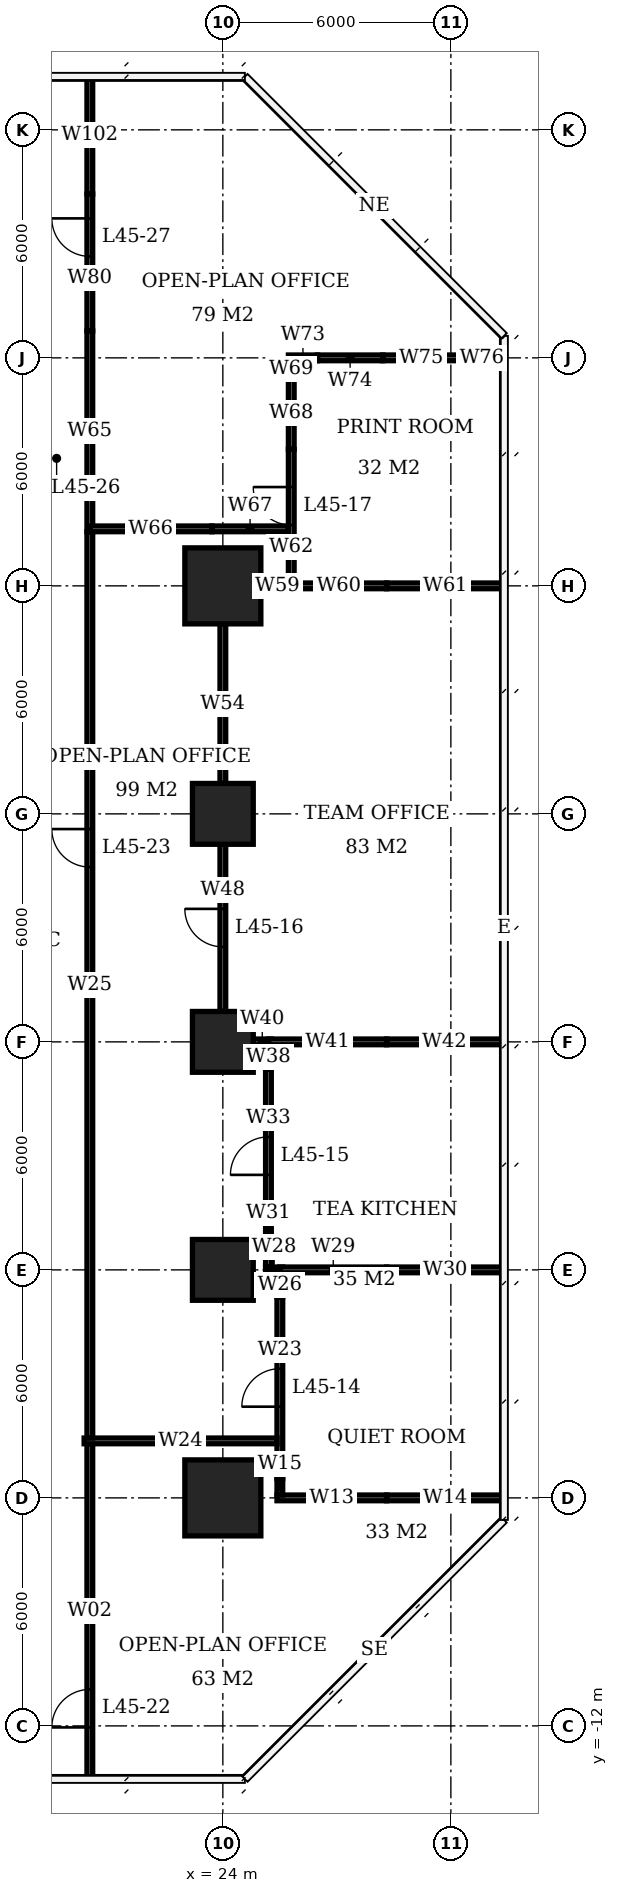
"""IFC4 building model, lengths in metres.
Left out: names, types, materials, properties, quantities, classifications, styles, units other than length and angle.
Written with IfcOpenShell. Run it as: python <this file> out.ifc"""

import sys

from ifc_helpers import new_model, si_unit, direction, frame, frame_2d, origin, origin_2d, place, context, subcontext, project, spatial, rectangle, extrude, element, fill, save


model = new_model("IFC4")
c1 = context("Model", 3, precision=1e-05, world=origin(), true_north=direction((0.0, 1.0)))
c2 = subcontext(c1, "Body", "Model", "MODEL_VIEW")
j1 = project(units=[si_unit("LENGTHUNIT", "METRE"), si_unit("PLANEANGLEUNIT", "RADIAN")], contexts=[c1])
p1 = place(None, origin())
s1 = spatial("IfcSite", under=j1, at=p1, CompositionType="ELEMENT")
p2 = place(p1, origin())
s2 = spatial("IfcBuilding", under=s1, at=p2, CompositionType="ELEMENT")
p3 = place(p2, frame((0.0, 0.0, 185.0)))
s3 = spatial("IfcBuildingStorey", under=s2, at=p3, CompositionType="ELEMENT", Elevation=185.0)
p4 = place(p3, frame((24.0, -6.0, 0.0), z_axis=(0.0, 0.0, 1.0), x_axis=(1.0, 0.0, 0.0)))
e1 = element("IfcColumn", 1, at=p4, inside=s3, PredefinedType="COLUMN", context=c2, shape_type="SweptSolid", body=[
    extrude(rectangle(XDim=2.0, YDim=2.0, at=origin_2d()), origin(), (0.0, 0.0, 1.0), 3.9),
])
for number, where, z_axis, x_axis in (
    (2, (24.0, 0.0, 0.0), (0.0, 0.0, 1.0), (1.0, 0.0, 0.0)),
    (3, (24.0, 6.0, 0.0), (0.0, 0.0, 1.0), (1.0, 0.0, 0.0)),
    (4, (24.0, 12.0, 0.0), (0.0, 0.0, 1.0), (1.0, 0.0, 0.0)),
):
    element("IfcColumn", number, at=place(p3, frame(where, z_axis=z_axis, x_axis=x_axis)), inside=s3, PredefinedType="COLUMN", context=c2, shape_type="SweptSolid", body=[
        extrude(rectangle(XDim=1.6, YDim=1.6, at=origin_2d()), origin(), (0.0, 0.0, 1.0), 3.9),
    ])
p5 = place(p3, frame((24.0, 18.0, 0.0), z_axis=(0.0, 0.0, 1.0), x_axis=(1.0, 0.0, 0.0)))
e5 = element("IfcColumn", 5, at=p5, inside=s3, PredefinedType="COLUMN", context=c2, shape_type="SweptSolid", body=[
    extrude(rectangle(XDim=2.0, YDim=2.0, at=origin_2d()), origin(), (0.0, 0.0, 1.0), 3.9),
])
p6 = place(p3, frame((25.425, -6.0, 0.0), z_axis=(0.0, 0.0, 1.0), x_axis=(1.0, 0.0, 0.0)))
e6 = element("IfcWall", 6, at=p6, inside=s3, PredefinedType="PARTITIONING", context=c2, shape_type="SweptSolid", body=[
    extrude(rectangle(XDim=2.885, YDim=0.15, at=frame_2d((1.442, 0.0))), origin(), (0.0, 0.0, 1.0), 2.65),
])
p7 = place(p3, frame((28.31, -6.0, 0.0), z_axis=(0.0, 0.0, 1.0), x_axis=(1.0, 0.0, 0.0)))
e7 = element("IfcWall", 7, at=p7, inside=s3, PredefinedType="PARTITIONING", context=c2, shape_type="SweptSolid", body=[
    extrude(rectangle(XDim=3.09, YDim=0.15, at=frame_2d((1.545, 0.0))), origin(), (0.0, 0.0, 1.0), 3.65),
])
p8 = place(p3, frame((25.125, 0.0, 0.0), z_axis=(0.0, 0.0, 1.0), x_axis=(1.0, 0.0, 0.0)))
e8 = element("IfcWall", 8, at=p8, inside=s3, PredefinedType="PARTITIONING", context=c2, shape_type="SweptSolid", body=[
    extrude(rectangle(XDim=0.45, YDim=0.15, at=frame_2d((0.225, 0.0))), origin(), (0.0, 0.0, 1.0), 2.65),
])
p9 = place(p3, frame((25.5, 0.0, 0.0), z_axis=(0.0, 0.0, 1.0), x_axis=(1.0, 0.0, 0.0)))
e9 = element("IfcWall", 9, at=p9, inside=s3, PredefinedType="PARTITIONING", context=c2, shape_type="SweptSolid", body=[
    extrude(rectangle(XDim=2.81, YDim=0.15, at=frame_2d((1.405, 0.0))), origin(), (0.0, 0.0, 1.0), 2.65),
])
p10 = place(p3, frame((28.31, 0.0, 0.0), z_axis=(0.0, 0.0, 1.0), x_axis=(1.0, 0.0, 0.0)))
e10 = element("IfcWall", 10, at=p10, inside=s3, PredefinedType="PARTITIONING", context=c2, shape_type="SweptSolid", body=[
    extrude(rectangle(XDim=3.09, YDim=0.15, at=frame_2d((1.545, 0.0))), origin(), (0.0, 0.0, 1.0), 3.65),
])
p11 = place(p3, frame((24.8, 6.0, 0.0), z_axis=(0.0, 0.0, 1.0), x_axis=(1.0, 0.0, 0.0)))
e11 = element("IfcWall", 11, at=p11, inside=s3, PredefinedType="PARTITIONING", context=c2, shape_type="SweptSolid", body=[
    extrude(rectangle(XDim=0.475, YDim=0.15, at=frame_2d((0.237, 0.0))), origin(), (0.0, 0.0, 1.0), 2.65),
])
p12 = place(p3, frame((25.2, 6.0, 0.0), z_axis=(0.0, 0.0, 1.0), x_axis=(1.0, 0.0, 0.0)))
e12 = element("IfcWall", 12, at=p12, inside=s3, PredefinedType="PARTITIONING", context=c2, shape_type="SweptSolid", body=[
    extrude(rectangle(XDim=3.11, YDim=0.15, at=frame_2d((1.555, 0.0))), origin(), (0.0, 0.0, 1.0), 2.65),
])
p13 = place(p3, frame((28.31, 6.0, 0.0), z_axis=(0.0, 0.0, 1.0), x_axis=(1.0, 0.0, 0.0)))
e13 = element("IfcWall", 13, at=p13, inside=s3, PredefinedType="PARTITIONING", context=c2, shape_type="SweptSolid", body=[
    extrude(rectangle(XDim=3.04, YDim=0.15, at=frame_2d((1.52, 0.0))), origin(), (0.0, 0.0, 1.0), 3.65),
])
p14 = place(p3, frame((25.0, 18.0, 0.0), z_axis=(0.0, 0.0, 1.0), x_axis=(1.0, 0.0, 0.0)))
e14 = element("IfcWall", 14, at=p14, inside=s3, PredefinedType="PARTITIONING", context=c2, shape_type="SweptSolid", body=[
    extrude(rectangle(XDim=0.875, YDim=0.15, at=frame_2d((0.438, 0.0))), origin(), (0.0, 0.0, 1.0), 2.65),
])
p15 = place(p3, frame((25.8, 18.0, 0.0), z_axis=(0.0, 0.0, 1.0), x_axis=(1.0, 0.0, 0.0)))
e15 = element("IfcWall", 15, at=p15, inside=s3, PredefinedType="PARTITIONING", context=c2, shape_type="SweptSolid", body=[
    extrude(rectangle(XDim=2.51, YDim=0.15, at=frame_2d((1.255, 0.0))), origin(), (0.0, 0.0, 1.0), 2.65),
])
p16 = place(p3, frame((28.31, 18.0, 0.0), z_axis=(0.0, 0.0, 1.0), x_axis=(1.0, 0.0, 0.0)))
e16 = element("IfcWall", 16, at=p16, inside=s3, PredefinedType="PARTITIONING", context=c2, shape_type="SweptSolid", body=[
    extrude(rectangle(XDim=3.09, YDim=0.15, at=frame_2d((1.545, 0.0))), origin(), (0.0, 0.0, 1.0), 3.65),
])
p17 = place(p3, frame((25.725, 24.0, 0.0), z_axis=(0.0, 0.0, 1.0), x_axis=(1.0, 0.0, 0.0)))
e17 = element("IfcWall", 17, at=p17, inside=s3, PredefinedType="PARTITIONING", context=c2, shape_type="SweptSolid", body=[
    extrude(rectangle(XDim=0.765, YDim=0.15, at=frame_2d((0.382, 0.0))), origin(), (0.0, 0.0, 1.0), 2.65),
])
p18 = place(p3, frame((26.49, 24.0, 0.0), z_axis=(0.0, 0.0, 1.0), x_axis=(1.0, 0.0, 0.0)))
e18 = element("IfcWall", 18, at=p18, inside=s3, PredefinedType="PARTITIONING", context=c2, shape_type="SweptSolid", body=[
    extrude(rectangle(XDim=1.718, YDim=0.15, at=frame_2d((0.859, 0.0))), origin(), (0.0, 0.0, 1.0), 3.65),
])
p19 = place(p3, frame((28.208, 24.0, 0.0), z_axis=(0.0, 0.0, 1.0), x_axis=(1.0, 0.0, 0.0)))
e19 = element("IfcWall", 19, at=p19, inside=s3, PredefinedType="PARTITIONING", context=c2, shape_type="SweptSolid", body=[
    extrude(rectangle(XDim=2.029, YDim=0.15, at=frame_2d((1.015, 0.0))), origin(), (0.0, 0.0, 1.0), 2.65),
])
p20 = place(p3, frame((30.237, 24.0, 0.0), z_axis=(0.0, 0.0, 1.0), x_axis=(1.0, 0.0, 0.0)))
e20 = element("IfcWall", 20, at=p20, inside=s3, PredefinedType="PARTITIONING", context=c2, shape_type="SweptSolid", body=[
    extrude(rectangle(XDim=1.163, YDim=0.15, at=frame_2d((0.582, 0.0))), origin(), (0.0, 0.0, 1.0), 3.65),
])
p21 = place(p3, frame((24.0, 6.8, 0.0), z_axis=(0.0, 0.0, 1.0), x_axis=(0.0, 1.0, 0.0)))
e21 = element("IfcWall", 21, at=p21, inside=s3, PredefinedType="PARTITIONING", context=c2, shape_type="SweptSolid", body=[
    extrude(rectangle(XDim=4.4, YDim=0.15, at=frame_2d((2.2, 0.0))), origin(), (0.0, 0.0, 1.0), 3.65),
])
p22 = place(p21, frame((1.7, 0.0, 0.0)))
e22 = element("IfcOpeningElement", 22, at=p22, cuts=e21, PredefinedType="OPENING", context=c2, shape_type="SweptSolid", body=[
    extrude(rectangle(XDim=1.0, YDim=2.1, at=frame_2d((0.5, 1.05))), frame((0.0, 0.085, 0.0), z_axis=(0.0, -1.0, 0.0), x_axis=(1.0, 0.0, 0.0)), (0.0, 0.0, 1.0), 0.17),
])
p23 = place(p3, frame((24.0, 12.8, 0.0), z_axis=(0.0, 0.0, 1.0), x_axis=(0.0, 1.0, 0.0)))
e23 = element("IfcWall", 23, at=p23, inside=s3, PredefinedType="PARTITIONING", context=c2, shape_type="SweptSolid", body=[
    extrude(rectangle(XDim=4.2, YDim=0.15, at=frame_2d((2.1, 0.0))), origin(), (0.0, 0.0, 1.0), 3.65),
])
p24 = place(p3, frame((25.2, 0.075, 0.0), z_axis=(0.0, 0.0, 1.0), x_axis=(0.0, 1.0, 0.0)))
e24 = element("IfcWall", 24, at=p24, inside=s3, PredefinedType="PARTITIONING", context=c2, shape_type="SweptSolid", body=[
    extrude(rectangle(XDim=0.635, YDim=0.15, at=frame_2d((0.317, 0.0))), origin(), (0.0, 0.0, 1.0), 2.65),
])
p25 = place(p3, frame((25.2, 0.71, 0.0), z_axis=(0.0, 0.0, 1.0), x_axis=(0.0, 1.0, 0.0)))
e25 = element("IfcWall", 25, at=p25, inside=s3, PredefinedType="PARTITIONING", context=c2, shape_type="SweptSolid", body=[
    extrude(rectangle(XDim=4.58, YDim=0.15, at=frame_2d((2.29, 0.0))), origin(), (0.0, 0.0, 1.0), 3.65),
])
p26 = place(p25, frame((1.79, 0.0, 0.0)))
e26 = element("IfcOpeningElement", 26, at=p26, cuts=e25, PredefinedType="OPENING", context=c2, shape_type="SweptSolid", body=[
    extrude(rectangle(XDim=1.0, YDim=2.1, at=frame_2d((0.5, 1.05))), frame((0.0, 0.085, 0.0), z_axis=(0.0, -1.0, 0.0), x_axis=(1.0, 0.0, 0.0)), (0.0, 0.0, 1.0), 0.17),
])
p27 = place(p3, frame((25.2, 5.29, 0.0), z_axis=(0.0, 0.0, 1.0), x_axis=(0.0, 1.0, 0.0)))
e27 = element("IfcWall", 27, at=p27, inside=s3, PredefinedType="PARTITIONING", context=c2, shape_type="SweptSolid", body=[
    extrude(rectangle(XDim=0.635, YDim=0.15, at=frame_2d((0.317, 0.0))), origin(), (0.0, 0.0, 1.0), 2.65),
])
p28 = place(p3, frame((25.5, -5.925, 0.0), z_axis=(0.0, 0.0, 1.0), x_axis=(0.0, 1.0, 0.0)))
e28 = element("IfcWall", 28, at=p28, inside=s3, PredefinedType="PARTITIONING", context=c2, shape_type="SweptSolid", body=[
    extrude(rectangle(XDim=0.435, YDim=0.15, at=frame_2d((0.218, 0.0))), origin(), (0.0, 0.0, 1.0), 2.65),
])
p29 = place(p3, frame((25.5, -5.49, 0.0), z_axis=(0.0, 0.0, 1.0), x_axis=(0.0, 1.0, 0.0)))
e29 = element("IfcWall", 29, at=p29, inside=s3, PredefinedType="PARTITIONING", context=c2, shape_type="SweptSolid", body=[
    extrude(rectangle(XDim=4.78, YDim=0.15, at=frame_2d((2.39, 0.0))), origin(), (0.0, 0.0, 1.0), 3.65),
])
p30 = place(p29, frame((1.89, 0.0, 0.0)))
e30 = element("IfcOpeningElement", 30, at=p30, cuts=e29, PredefinedType="OPENING", context=c2, shape_type="SweptSolid", body=[
    extrude(rectangle(XDim=1.0, YDim=2.1, at=frame_2d((0.5, 1.05))), frame((0.0, 0.085, 0.0), z_axis=(0.0, -1.0, 0.0), x_axis=(1.0, 0.0, 0.0)), (0.0, 0.0, 1.0), 0.17),
])
p31 = place(p3, frame((25.5, -0.71, 0.0), z_axis=(0.0, 0.0, 1.0), x_axis=(0.0, 1.0, 0.0)))
e31 = element("IfcWall", 31, at=p31, inside=s3, PredefinedType="PARTITIONING", context=c2, shape_type="SweptSolid", body=[
    extrude(rectangle(XDim=0.635, YDim=0.15, at=frame_2d((0.317, 0.0))), origin(), (0.0, 0.0, 1.0), 2.65),
])
p32 = place(p3, frame((25.8, 18.075, 0.0), z_axis=(0.0, 0.0, 1.0), x_axis=(0.0, 1.0, 0.0)))
e32 = element("IfcWall", 32, at=p32, inside=s3, PredefinedType="PARTITIONING", context=c2, shape_type="SweptSolid", body=[
    extrude(rectangle(XDim=3.517, YDim=0.15, at=frame_2d((1.759, 0.0))), origin(), (0.0, 0.0, 1.0), 2.65),
])
p33 = place(p32, frame((1.525, 0.0, 0.0)))
e33 = element("IfcOpeningElement", 33, at=p33, cuts=e32, PredefinedType="OPENING", context=c2, shape_type="SweptSolid", body=[
    extrude(rectangle(XDim=1.0, YDim=2.1, at=frame_2d((0.5, 1.05))), frame((0.0, 0.085, 0.0), z_axis=(0.0, -1.0, 0.0), x_axis=(1.0, 0.0, 0.0)), (0.0, 0.0, 1.0), 0.17),
])
p34 = place(p3, frame((25.8, 21.592, 0.0), z_axis=(0.0, 0.0, 1.0), x_axis=(0.0, 1.0, 0.0)))
e34 = element("IfcWall", 34, at=p34, inside=s3, PredefinedType="PARTITIONING", context=c2, shape_type="SweptSolid", body=[
    extrude(rectangle(XDim=1.918, YDim=0.15, at=frame_2d((0.959, 0.0))), origin(), (0.0, 0.0, 1.0), 3.65),
])
p35 = place(p3, frame((25.8, 23.51, 0.0), z_axis=(0.0, 0.0, 1.0), x_axis=(0.0, 1.0, 0.0)))
e35 = element("IfcWall", 35, at=p35, inside=s3, PredefinedType="PARTITIONING", context=c2, shape_type="SweptSolid", body=[
    extrude(rectangle(XDim=0.415, YDim=0.15, at=frame_2d((0.208, 0.0))), origin(), (0.0, 0.0, 1.0), 2.65),
])
p36 = place(p3, frame((20.5, -13.4, 0.0), z_axis=(0.0, 0.0, 1.0), x_axis=(0.0, 1.0, 0.0)))
e36 = element("IfcWall", 36, at=p36, inside=s3, PredefinedType="PARTITIONING", context=c2, shape_type="SweptSolid", body=[
    extrude(rectangle(XDim=8.825, YDim=0.15, at=frame_2d((4.413, 0.0))), origin(), (0.0, 0.0, 1.0), 3.65),
])
p37 = place(p36, frame((1.36, 0.0, 0.0)))
e37 = element("IfcOpeningElement", 37, at=p37, cuts=e36, PredefinedType="OPENING", context=c2, shape_type="SweptSolid", body=[
    extrude(rectangle(XDim=1.0, YDim=2.1, at=frame_2d((0.5, 1.05))), frame((0.0, 0.085, 0.0), z_axis=(0.0, -1.0, 0.0), x_axis=(1.0, 0.0, 0.0)), (0.0, 0.0, 1.0), 0.17),
])
p38 = place(p3, frame((20.5, -4.425, 0.0), z_axis=(0.0, 0.0, 1.0), x_axis=(0.0, 1.0, 0.0)))
e38 = element("IfcWall", 38, at=p38, inside=s3, PredefinedType="PARTITIONING", context=c2, shape_type="SweptSolid", body=[
    extrude(rectangle(XDim=23.85, YDim=0.15, at=frame_2d((11.925, 0.0))), origin(), (0.0, 0.0, 1.0), 3.65),
])
p39 = place(p38, frame((15.025, 0.0, 0.0)))
e39 = element("IfcOpeningElement", 39, at=p39, cuts=e38, PredefinedType="OPENING", context=c2, shape_type="SweptSolid", body=[
    extrude(rectangle(XDim=1.0, YDim=2.1, at=frame_2d((0.5, 1.05))), frame((0.0, 0.085, 0.0), z_axis=(0.0, -1.0, 0.0), x_axis=(1.0, 0.0, 0.0)), (0.0, 0.0, 1.0), 0.17),
])
p40 = place(p3, frame((20.35, -4.5, 0.0), z_axis=(0.0, 0.0, 1.0), x_axis=(1.0, 0.0, 0.0)))
e40 = element("IfcWall", 40, at=p40, inside=s3, PredefinedType="PARTITIONING", context=c2, shape_type="SweptSolid", body=[
    extrude(rectangle(XDim=5.075, YDim=0.15, at=frame_2d((2.538, 0.0))), origin(), (0.0, 0.0, 1.0), 3.65),
])
p41 = place(p3, frame((20.5, 19.425, 0.0), z_axis=(0.0, 0.0, 1.0), x_axis=(0.0, 1.0, 0.0)))
e41 = element("IfcWall", 41, at=p41, inside=s3, PredefinedType="PARTITIONING", context=c2, shape_type="SweptSolid", body=[
    extrude(rectangle(XDim=5.283, YDim=0.15, at=frame_2d((2.642, 0.0))), origin(), (0.0, 0.0, 1.0), 3.65),
])
p42 = place(p3, frame((20.5, 24.708, 0.0), z_axis=(0.0, 0.0, 1.0), x_axis=(0.0, 1.0, 0.0)))
e42 = element("IfcWall", 42, at=p42, inside=s3, PredefinedType="PARTITIONING", context=c2, shape_type="SweptSolid", body=[
    extrude(rectangle(XDim=3.602, YDim=0.15, at=frame_2d((1.801, 0.0))), origin(), (0.0, 0.0, 1.0), 2.65),
])
p43 = place(p42, frame((1.962, 0.0, 0.0)))
e43 = element("IfcOpeningElement", 43, at=p43, cuts=e42, PredefinedType="OPENING", context=c2, shape_type="SweptSolid", body=[
    extrude(rectangle(XDim=1.0, YDim=2.1, at=frame_2d((0.5, 1.05))), frame((0.0, 0.085, 0.0), z_axis=(0.0, -1.0, 0.0), x_axis=(1.0, 0.0, 0.0)), (0.0, 0.0, 1.0), 0.17),
])
p44 = place(p3, frame((20.5, 28.31, 0.0), z_axis=(0.0, 0.0, 1.0), x_axis=(0.0, 1.0, 0.0)))
e44 = element("IfcWall", 44, at=p44, inside=s3, PredefinedType="PARTITIONING", context=c2, shape_type="SweptSolid", body=[
    extrude(rectangle(XDim=3.09, YDim=0.15, at=frame_2d((1.545, 0.0))), origin(), (0.0, 0.0, 1.0), 3.65),
])
p45 = place(p3, frame((20.5, 19.5, 0.0), z_axis=(0.0, 0.0, 1.0), x_axis=(1.0, 0.0, 0.0)))
e45 = element("IfcWall", 45, at=p45, inside=s3, PredefinedType="PARTITIONING", context=c2, shape_type="SweptSolid", body=[
    extrude(rectangle(XDim=3.208, YDim=0.15, at=frame_2d((1.604, 0.0))), origin(), (0.0, 0.0, 1.0), 3.65),
])
p46 = place(p3, frame((23.708, 19.5, 0.0), z_axis=(0.0, 0.0, 1.0), x_axis=(1.0, 0.0, 0.0)))
e46 = element("IfcWall", 46, at=p46, inside=s3, PredefinedType="PARTITIONING", context=c2, shape_type="SweptSolid", body=[
    extrude(rectangle(XDim=2.017, YDim=0.15, at=frame_2d((1.009, 0.0))), origin(), (0.0, 0.0, 1.0), 2.65),
])
p47 = place(p30, origin())
e47 = element("IfcDoor", 47, at=p47, inside=s3, OperationType="SINGLE_SWING_LEFT", PredefinedType="DOOR", context=c2, shape_type="SweptSolid", body=[
    extrude(rectangle(XDim=1.0, YDim=2.1, at=frame_2d((0.5, 1.05))), frame((0.0, 0.025, 0.0), z_axis=(0.0, -1.0, 0.0), x_axis=(1.0, 0.0, 0.0)), (0.0, 0.0, 1.0), 0.05),
])
fill(e30, e47)
p48 = place(p26, origin())
e48 = element("IfcDoor", 48, at=p48, inside=s3, OperationType="SINGLE_SWING_LEFT", PredefinedType="DOOR", context=c2, shape_type="SweptSolid", body=[
    extrude(rectangle(XDim=1.0, YDim=2.1, at=frame_2d((0.5, 1.05))), frame((0.0, 0.025, 0.0), z_axis=(0.0, -1.0, 0.0), x_axis=(1.0, 0.0, 0.0)), (0.0, 0.0, 1.0), 0.05),
])
fill(e26, e48)
p49 = place(p22, origin())
e49 = element("IfcDoor", 49, at=p49, inside=s3, OperationType="SINGLE_SWING_RIGHT", PredefinedType="DOOR", context=c2, shape_type="SweptSolid", body=[
    extrude(rectangle(XDim=1.0, YDim=2.1, at=frame_2d((0.5, 1.05))), frame((0.0, 0.025, 0.0), z_axis=(0.0, -1.0, 0.0), x_axis=(1.0, 0.0, 0.0)), (0.0, 0.0, 1.0), 0.05),
])
fill(e22, e49)
p50 = place(p33, origin())
e50 = element("IfcDoor", 50, at=p50, inside=s3, OperationType="SINGLE_SWING_RIGHT", PredefinedType="DOOR", context=c2, shape_type="SweptSolid", body=[
    extrude(rectangle(XDim=1.0, YDim=2.1, at=frame_2d((0.5, 1.05))), frame((0.0, 0.025, 0.0), z_axis=(0.0, -1.0, 0.0), x_axis=(1.0, 0.0, 0.0)), (0.0, 0.0, 1.0), 0.05),
])
fill(e33, e50)
p51 = place(p37, origin())
e51 = element("IfcDoor", 51, at=p51, inside=s3, OperationType="SINGLE_SWING_LEFT", PredefinedType="DOOR", context=c2, shape_type="SweptSolid", body=[
    extrude(rectangle(XDim=1.0, YDim=2.1, at=frame_2d((0.5, 1.05))), frame((0.0, 0.025, 0.0), z_axis=(0.0, -1.0, 0.0), x_axis=(1.0, 0.0, 0.0)), (0.0, 0.0, 1.0), 0.05),
])
fill(e37, e51)
p52 = place(p39, origin())
e52 = element("IfcDoor", 52, at=p52, inside=s3, OperationType="SINGLE_SWING_RIGHT", PredefinedType="DOOR", context=c2, shape_type="SweptSolid", body=[
    extrude(rectangle(XDim=1.0, YDim=2.1, at=frame_2d((0.5, 1.05))), frame((0.0, 0.025, 0.0), z_axis=(0.0, -1.0, 0.0), x_axis=(1.0, 0.0, 0.0)), (0.0, 0.0, 1.0), 0.05),
])
fill(e39, e52)
p53 = place(p43, origin())
e53 = element("IfcDoor", 53, at=p53, inside=s3, OperationType="SINGLE_SWING_RIGHT", PredefinedType="DOOR", context=c2, shape_type="SweptSolid", body=[
    extrude(rectangle(XDim=1.0, YDim=2.1, at=frame_2d((0.5, 1.05))), frame((0.0, 0.025, 0.0), z_axis=(0.0, -1.0, 0.0), x_axis=(1.0, 0.0, 0.0)), (0.0, 0.0, 1.0), 0.05),
])
fill(e43, e53)
save(model, sys.argv[1])
